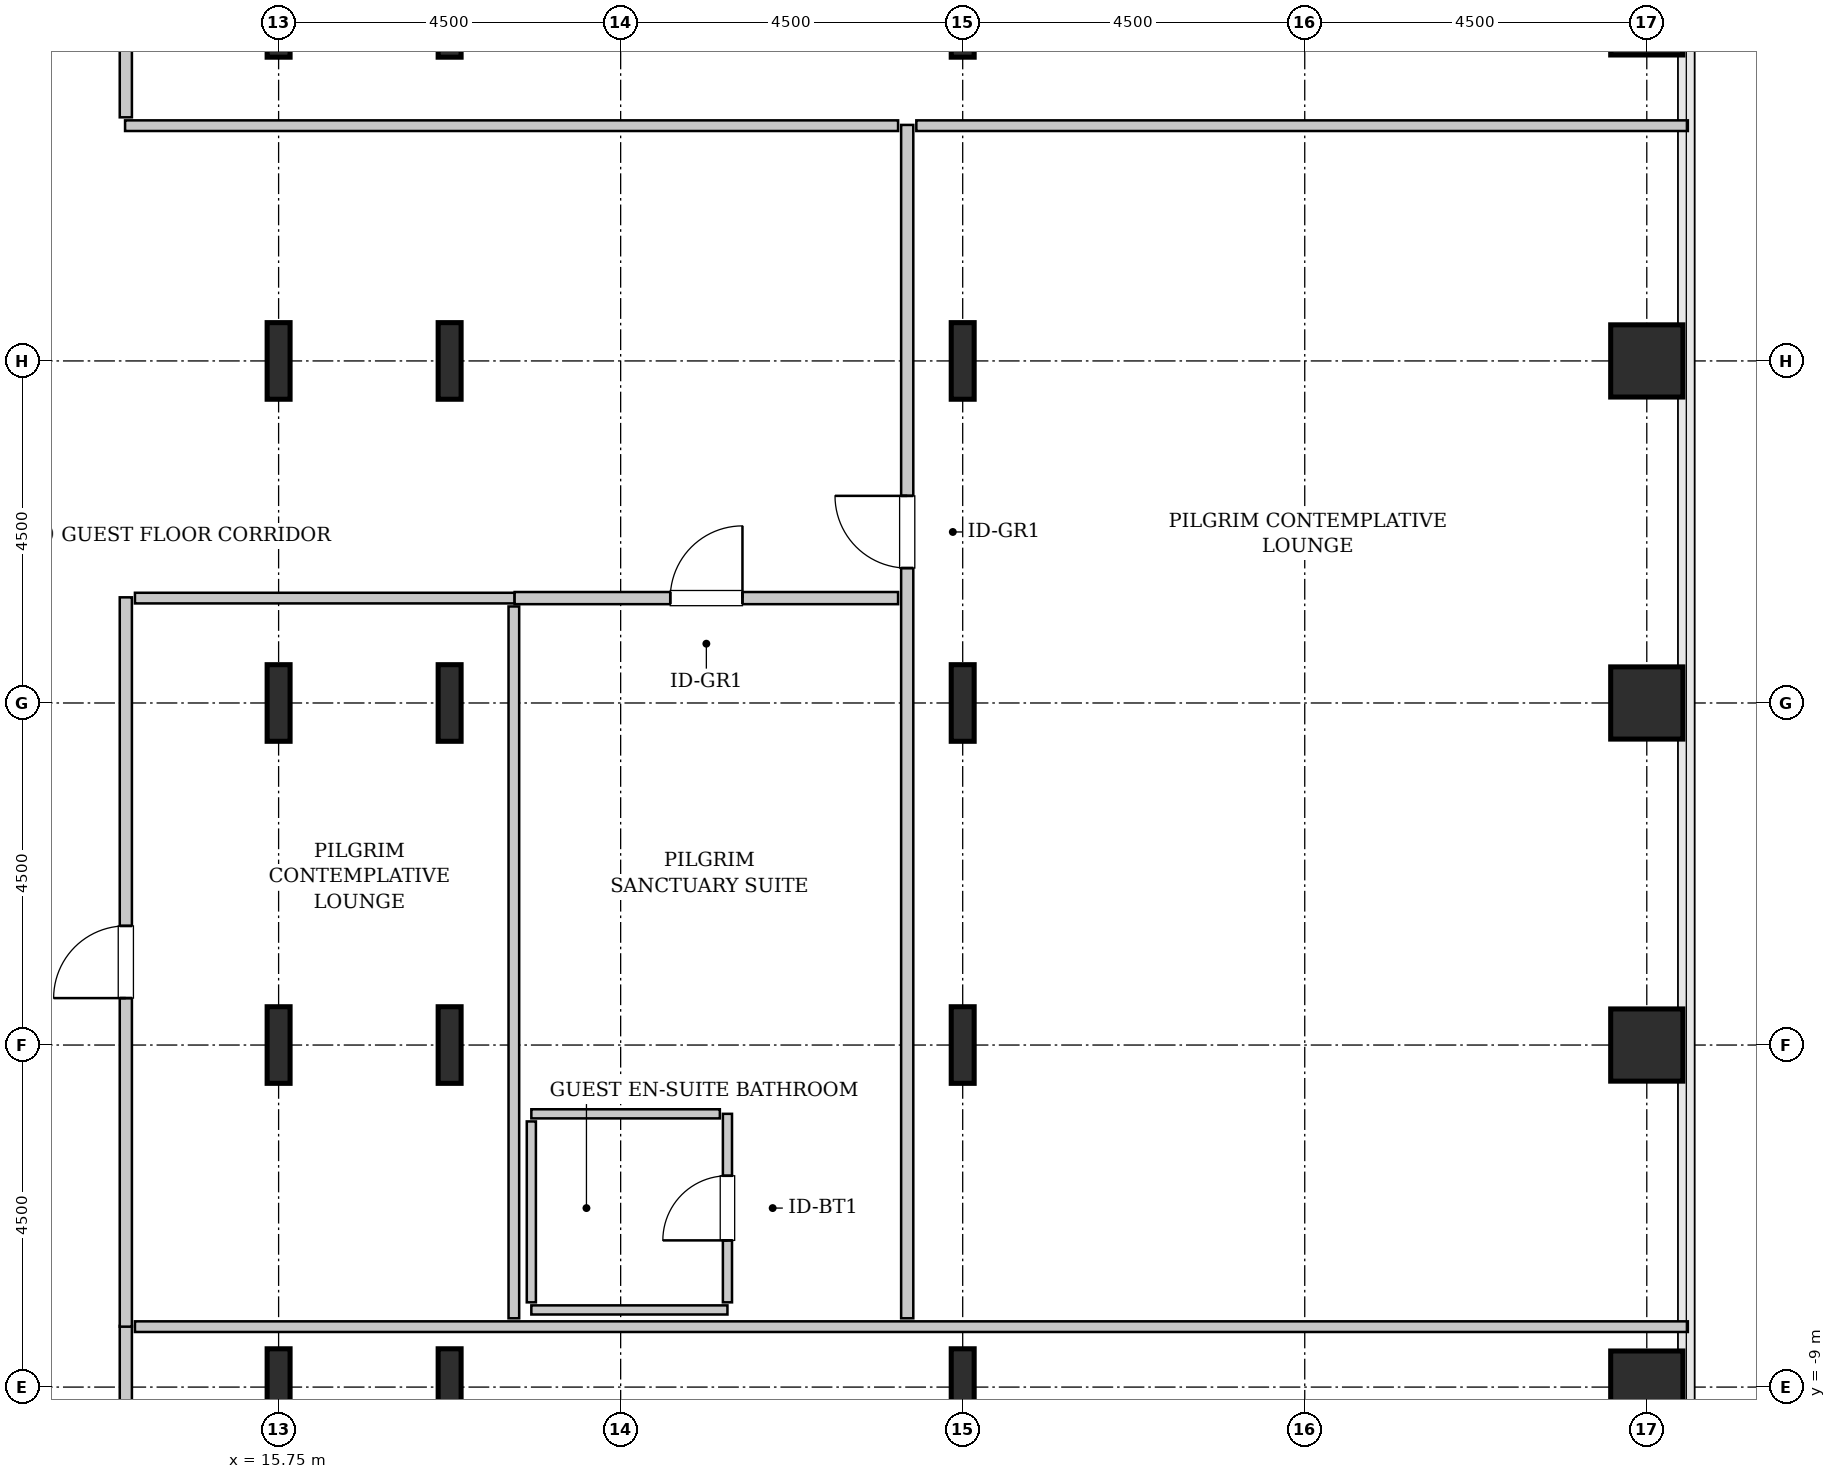
"""IFC4 building model, lengths in metres.
Left out: names, types, materials, properties, quantities, classifications, styles, units other than length and angle.
Written with IfcOpenShell. Run it as: python <this file> out.ifc"""

import sys

from ifc_helpers import new_model, si_unit, direction, frame, frame_2d, origin, origin_2d, place, context, subcontext, project, spatial, rectangle, hollow_rectangle, i_section, extrude, source, transform, mapped, element, fill, save


model = new_model("IFC4")
c1 = context("Model", 3, precision=1e-05, world=origin(), true_north=direction((0.0, 1.0)))
c2 = subcontext(c1, "Body", "Model", "MODEL_VIEW")
j1 = project(units=[si_unit("LENGTHUNIT", "METRE"), si_unit("PLANEANGLEUNIT", "RADIAN")], contexts=[c1])
p1 = place(None, origin())
s1 = spatial("IfcSite", under=j1, at=p1, CompositionType="ELEMENT")
p2 = place(p1, origin())
s2 = spatial("IfcBuilding", under=s1, at=p2, CompositionType="ELEMENT")
p3 = place(p2, frame((0.0, 0.0, 82.4)))
s3 = spatial("IfcBuildingStorey", under=s2, at=p3, CompositionType="ELEMENT", Elevation=82.4)
m1 = source(origin(), c2, "Body", "SweptSolid", [
    extrude(i_section(OverallWidth=0.302, OverallDepth=1.008, WebThickness=0.021, FlangeThickness=0.04, FilletRadius=0.03, at=origin_2d()), origin(), (0.0, 0.0, 1.0), 3.8),
])
for number, where, z_axis, x_axis in (
    (1, (15.75, -9.0, 0.0), (0.0, 0.0, 1.0), (1.0, 0.0, 0.0)),
    (2, (15.75, -4.5, 0.0), (0.0, 0.0, 1.0), (1.0, 0.0, 0.0)),
    (3, (15.75, 0.0, 0.0), (0.0, 0.0, 1.0), (1.0, 0.0, 0.0)),
    (4, (15.75, 4.5, 0.0), (0.0, 0.0, 1.0), (1.0, 0.0, 0.0)),
    (5, (15.75, 9.0, 0.0), (0.0, 0.0, 1.0), (1.0, 0.0, 0.0)),
    (6, (18.0, -9.0, 0.0), (0.0, 0.0, 1.0), (1.0, 0.0, 0.0)),
    (7, (18.0, -4.5, 0.0), (0.0, 0.0, 1.0), (1.0, 0.0, 0.0)),
    (8, (18.0, 0.0, 0.0), (0.0, 0.0, 1.0), (1.0, 0.0, 0.0)),
    (9, (18.0, 4.5, 0.0), (0.0, 0.0, 1.0), (1.0, 0.0, 0.0)),
    (10, (18.0, 9.0, 0.0), (0.0, 0.0, 1.0), (1.0, 0.0, 0.0)),
    (11, (24.75, -9.0, 0.0), (0.0, 0.0, 1.0), (1.0, 0.0, 0.0)),
    (12, (24.75, -4.5, 0.0), (0.0, 0.0, 1.0), (1.0, 0.0, 0.0)),
    (13, (24.75, 0.0, 0.0), (0.0, 0.0, 1.0), (1.0, 0.0, 0.0)),
    (14, (24.75, 4.5, 0.0), (0.0, 0.0, 1.0), (1.0, 0.0, 0.0)),
    (15, (24.75, 9.0, 0.0), (0.0, 0.0, 1.0), (1.0, 0.0, 0.0)),
):
    element("IfcColumn", number, at=place(p3, frame(where, z_axis=z_axis, x_axis=x_axis)), inside=s3, PredefinedType="COLUMN", context=c2, shape_type="MappedRepresentation", body=[
        mapped(m1, transform((0.0, 0.0, 0.0), x_axis=(1.0, 0.0, 0.0), y_axis=(0.0, 1.0, 0.0), z_axis=(0.0, 0.0, 1.0), scale=1.0)),
    ])
m2 = source(origin(), c2, "Body", "SweptSolid", [
    extrude(hollow_rectangle(XDim=0.95, YDim=0.95, WallThickness=0.045, InnerFilletRadius=0.045, OuterFilletRadius=0.09, at=origin_2d()), origin(), (0.0, 0.0, 1.0), 3.8),
])
for number, where, z_axis, x_axis in (
    (16, (33.75, -9.0, 0.0), (0.0, 0.0, 1.0), (1.0, 0.0, 0.0)),
    (17, (33.75, -4.5, 0.0), (0.0, 0.0, 1.0), (1.0, 0.0, 0.0)),
    (18, (33.75, 0.0, 0.0), (0.0, 0.0, 1.0), (1.0, 0.0, 0.0)),
    (19, (33.75, 4.5, 0.0), (0.0, 0.0, 1.0), (1.0, 0.0, 0.0)),
    (20, (33.75, 9.0, 0.0), (0.0, 0.0, 1.0), (1.0, 0.0, 0.0)),
):
    element("IfcColumn", number, at=place(p3, frame(where, z_axis=z_axis, x_axis=x_axis)), inside=s3, PredefinedType="COLUMN", context=c2, shape_type="MappedRepresentation", body=[
        mapped(m2, transform((0.0, 0.0, 0.0), x_axis=(1.0, 0.0, 0.0), y_axis=(0.0, 1.0, 0.0), z_axis=(0.0, 0.0, 1.0), scale=1.0)),
    ])
m3 = source(origin(), c2, "Body", "SweptSolid", [
    extrude(rectangle(XDim=2.58, YDim=0.12, at=frame_2d((1.29, 0.0))), origin(), (0.0, 0.0, 1.0), 3.485),
])
p4 = place(p3, frame((19.075, -7.985, 0.0), z_axis=(0.0, 0.0, 1.0), x_axis=(1.0, 0.0, 0.0)))
e21 = element("IfcWall", 21, at=p4, inside=s3, PredefinedType="PLUMBINGWALL", context=c2, shape_type="MappedRepresentation", body=[
    mapped(m3, transform((0.0, 0.0, 0.0), x_axis=(1.0, 0.0, 0.0), y_axis=(0.0, 1.0, 0.0), z_axis=(0.0, 0.0, 1.0), scale=1.0)),
])
m4 = source(origin(), c2, "Body", "SweptSolid", [
    extrude(rectangle(XDim=2.48, YDim=0.12, at=frame_2d((1.24, 0.0))), origin(), (0.0, 0.0, 1.0), 3.485),
])
p5 = place(p3, frame((21.655, -7.885, 0.0), z_axis=(0.0, 0.0, 1.0), x_axis=(0.0, 1.0, 0.0)))
e22 = element("IfcWall", 22, at=p5, inside=s3, PredefinedType="PLUMBINGWALL", context=c2, shape_type="MappedRepresentation", body=[
    mapped(m4, transform((0.0, 0.0, 0.0), x_axis=(1.0, 0.0, 0.0), y_axis=(0.0, 1.0, 0.0), z_axis=(0.0, 0.0, 1.0), scale=1.0)),
])
p6 = place(p5, frame((0.815, 0.0, 0.0)))
e23 = element("IfcOpeningElement", 23, at=p6, cuts=e22, PredefinedType="OPENING", context=c2, shape_type="SweptSolid", body=[
    extrude(rectangle(XDim=0.85, YDim=2.1, at=frame_2d((0.425, 1.05))), frame((0.0, 0.07, 0.0), z_axis=(0.0, -1.0, 0.0), x_axis=(1.0, 0.0, 0.0)), (0.0, 0.0, 1.0), 0.14),
])
p7 = place(p3, frame((19.075, -5.405, 0.0), z_axis=(0.0, 0.0, 1.0), x_axis=(1.0, 0.0, 0.0)))
e24 = element("IfcWall", 24, at=p7, inside=s3, PredefinedType="PLUMBINGWALL", context=c2, shape_type="MappedRepresentation", body=[
    mapped(m4, transform((0.0, 0.0, 0.0), x_axis=(1.0, 0.0, 0.0), y_axis=(0.0, 1.0, 0.0), z_axis=(0.0, 0.0, 1.0), scale=1.0)),
])
m5 = source(origin(), c2, "Body", "SweptSolid", [
    extrude(rectangle(XDim=2.38, YDim=0.12, at=frame_2d((1.19, 0.0))), origin(), (0.0, 0.0, 1.0), 3.485),
])
p8 = place(p3, frame((19.075, -7.885, 0.0), z_axis=(0.0, 0.0, 1.0), x_axis=(0.0, 1.0, 0.0)))
e25 = element("IfcWall", 25, at=p8, inside=s3, PredefinedType="PLUMBINGWALL", context=c2, shape_type="MappedRepresentation", body=[
    mapped(m5, transform((0.0, 0.0, 0.0), x_axis=(1.0, 0.0, 0.0), y_axis=(0.0, 1.0, 0.0), z_axis=(0.0, 0.0, 1.0), scale=1.0)),
])
m6 = source(origin(), c2, "Body", "SweptSolid", [
    extrude(rectangle(XDim=14.845, YDim=0.16, at=frame_2d((7.422, 0.0))), origin(), (0.0, 0.0, 1.0), 3.485),
])
p9 = place(p3, frame((13.74, -23.04, 0.0), z_axis=(0.0, 0.0, 1.0), x_axis=(0.0, 1.0, 0.0)))
e26 = element("IfcWall", 26, at=p9, inside=s3, PredefinedType="PARTITIONING", context=c2, shape_type="MappedRepresentation", body=[
    mapped(m6, transform((0.0, 0.0, 0.0), x_axis=(1.0, 0.0, 0.0), y_axis=(0.0, 1.0, 0.0), z_axis=(0.0, 0.0, 1.0), scale=1.0)),
])
p10 = place(p9, frame((12.712, 0.0, 0.0)))
e27 = element("IfcOpeningElement", 27, at=p10, cuts=e26, PredefinedType="OPENING", context=c2, shape_type="SweptSolid", body=[
    extrude(rectangle(XDim=0.95, YDim=2.1, at=frame_2d((0.475, 1.05))), frame((0.0, 0.09, 0.0), z_axis=(0.0, -1.0, 0.0), x_axis=(1.0, 0.0, 0.0)), (0.0, 0.0, 1.0), 0.18),
])
m7 = source(origin(), c2, "Body", "SweptSolid", [
    extrude(rectangle(XDim=20.43, YDim=0.14, at=frame_2d((10.215, 0.0))), origin(), (0.0, 0.0, 1.0), 3.485),
])
p11 = place(p3, frame((13.86, -8.205, 0.0), z_axis=(0.0, 0.0, 1.0), x_axis=(1.0, 0.0, 0.0)))
e28 = element("IfcWall", 28, at=p11, inside=s3, PredefinedType="PARTITIONING", context=c2, shape_type="MappedRepresentation", body=[
    mapped(m7, transform((0.0, 0.0, 0.0), x_axis=(1.0, 0.0, 0.0), y_axis=(0.0, 1.0, 0.0), z_axis=(0.0, 0.0, 1.0), scale=1.0)),
])
m8 = source(origin(), c2, "Body", "SweptSolid", [
    extrude(rectangle(XDim=15.7, YDim=0.16, at=frame_2d((7.85, 0.0))), origin(), (0.0, 0.0, 1.0), 3.485),
])
p12 = place(p3, frame((24.02, -8.095, 0.0), z_axis=(0.0, 0.0, 1.0), x_axis=(0.0, 1.0, 0.0)))
e29 = element("IfcWall", 29, at=p12, inside=s3, PredefinedType="PARTITIONING", context=c2, shape_type="MappedRepresentation", body=[
    mapped(m8, transform((0.0, 0.0, 0.0), x_axis=(1.0, 0.0, 0.0), y_axis=(0.0, 1.0, 0.0), z_axis=(0.0, 0.0, 1.0), scale=1.0)),
])
p13 = place(p12, frame((9.87, 0.0, 0.0)))
e30 = element("IfcOpeningElement", 30, at=p13, cuts=e29, PredefinedType="OPENING", context=c2, shape_type="SweptSolid", body=[
    extrude(rectangle(XDim=0.95, YDim=2.1, at=frame_2d((0.475, 1.05))), frame((0.0, 0.09, 0.0), z_axis=(0.0, -1.0, 0.0), x_axis=(1.0, 0.0, 0.0)), (0.0, 0.0, 1.0), 0.18),
])
m9 = source(origin(), c2, "Body", "SweptSolid", [
    extrude(rectangle(XDim=10.17, YDim=0.14, at=frame_2d((5.085, 0.0))), origin(), (0.0, 0.0, 1.0), 3.485),
])
p14 = place(p3, frame((13.73, 7.595, 0.0), z_axis=(0.0, 0.0, 1.0), x_axis=(1.0, 0.0, 0.0)))
e31 = element("IfcWall", 31, at=p14, inside=s3, PredefinedType="PARTITIONING", context=c2, shape_type="MappedRepresentation", body=[
    mapped(m9, transform((0.0, 0.0, 0.0), x_axis=(1.0, 0.0, 0.0), y_axis=(0.0, 1.0, 0.0), z_axis=(0.0, 0.0, 1.0), scale=1.0)),
])
m10 = source(origin(), c2, "Body", "SweptSolid", [
    extrude(rectangle(XDim=10.15, YDim=0.14, at=frame_2d((5.075, 0.0))), origin(), (0.0, 0.0, 1.0), 3.485),
])
p15 = place(p3, frame((24.14, 7.595, 0.0), z_axis=(0.0, 0.0, 1.0), x_axis=(1.0, 0.0, 0.0)))
e32 = element("IfcWall", 32, at=p15, inside=s3, PredefinedType="PARTITIONING", context=c2, shape_type="MappedRepresentation", body=[
    mapped(m10, transform((0.0, 0.0, 0.0), x_axis=(1.0, 0.0, 0.0), y_axis=(0.0, 1.0, 0.0), z_axis=(0.0, 0.0, 1.0), scale=1.0)),
])
m11 = source(origin(), c2, "Body", "SweptSolid", [
    extrude(rectangle(XDim=9.595, YDim=0.16, at=frame_2d((4.797, 0.0))), origin(), (0.0, 0.0, 1.0), 3.485),
])
p16 = place(p3, frame((13.74, -8.205, 0.0), z_axis=(0.0, 0.0, 1.0), x_axis=(0.0, 1.0, 0.0)))
e33 = element("IfcWall", 33, at=p16, inside=s3, PredefinedType="PARTITIONING", context=c2, shape_type="MappedRepresentation", body=[
    mapped(m11, transform((0.0, 0.0, 0.0), x_axis=(1.0, 0.0, 0.0), y_axis=(0.0, 1.0, 0.0), z_axis=(0.0, 0.0, 1.0), scale=1.0)),
])
p17 = place(p16, frame((4.323, 0.0, 0.0)))
e34 = element("IfcOpeningElement", 34, at=p17, cuts=e33, PredefinedType="OPENING", context=c2, shape_type="SweptSolid", body=[
    extrude(rectangle(XDim=0.95, YDim=2.1, at=frame_2d((0.475, 1.05))), frame((0.0, 0.09, 0.0), z_axis=(0.0, -1.0, 0.0), x_axis=(1.0, 0.0, 0.0)), (0.0, 0.0, 1.0), 0.18),
])
m12 = source(origin(), c2, "Body", "SweptSolid", [
    extrude(rectangle(XDim=4.995, YDim=0.14, at=frame_2d((2.498, 0.0))), origin(), (0.0, 0.0, 1.0), 3.485),
])
p18 = place(p3, frame((13.86, 1.38, 0.0), z_axis=(0.0, 0.0, 1.0), x_axis=(1.0, 0.0, 0.0)))
e35 = element("IfcWall", 35, at=p18, inside=s3, PredefinedType="PARTITIONING", context=c2, shape_type="MappedRepresentation", body=[
    mapped(m12, transform((0.0, 0.0, 0.0), x_axis=(1.0, 0.0, 0.0), y_axis=(0.0, 1.0, 0.0), z_axis=(0.0, 0.0, 1.0), scale=1.0)),
])
m13 = source(origin(), c2, "Body", "SweptSolid", [
    extrude(rectangle(XDim=9.365, YDim=0.14, at=frame_2d((4.683, 0.0))), origin(), (0.0, 0.0, 1.0), 3.485),
])
p19 = place(p3, frame((18.845, -8.095, 0.0), z_axis=(0.0, 0.0, 1.0), x_axis=(0.0, 1.0, 0.0)))
e36 = element("IfcWall", 36, at=p19, inside=s3, PredefinedType="PARTITIONING", context=c2, shape_type="MappedRepresentation", body=[
    mapped(m13, transform((0.0, 0.0, 0.0), x_axis=(1.0, 0.0, 0.0), y_axis=(0.0, 1.0, 0.0), z_axis=(0.0, 0.0, 1.0), scale=1.0)),
])
m14 = source(origin(), c2, "Body", "SweptSolid", [
    extrude(rectangle(XDim=5.045, YDim=0.16, at=frame_2d((2.522, 0.0))), origin(), (0.0, 0.0, 1.0), 3.485),
])
p20 = place(p3, frame((18.855, 1.38, 0.0), z_axis=(0.0, 0.0, 1.0), x_axis=(1.0, 0.0, 0.0)))
e37 = element("IfcWall", 37, at=p20, inside=s3, PredefinedType="PARTITIONING", context=c2, shape_type="MappedRepresentation", body=[
    mapped(m14, transform((0.0, 0.0, 0.0), x_axis=(1.0, 0.0, 0.0), y_axis=(0.0, 1.0, 0.0), z_axis=(0.0, 0.0, 1.0), scale=1.0)),
])
p21 = place(p20, frame((2.048, 0.0, 0.0)))
e38 = element("IfcOpeningElement", 38, at=p21, cuts=e37, PredefinedType="OPENING", context=c2, shape_type="SweptSolid", body=[
    extrude(rectangle(XDim=0.95, YDim=2.1, at=frame_2d((0.475, 1.05))), frame((0.0, 0.09, 0.0), z_axis=(0.0, -1.0, 0.0), x_axis=(1.0, 0.0, 0.0)), (0.0, 0.0, 1.0), 0.18),
])
m15 = source(origin(), c2, "Body", "SweptSolid", [
    extrude(rectangle(XDim=15.335, YDim=0.16, at=frame_2d((7.667, 0.0))), origin(), (0.0, 0.0, 1.0), 3.485),
])
p22 = place(p3, frame((13.74, 7.705, 0.0), z_axis=(0.0, 0.0, 1.0), x_axis=(0.0, 1.0, 0.0)))
e39 = element("IfcWall", 39, at=p22, inside=s3, PredefinedType="PARTITIONING", context=c2, shape_type="MappedRepresentation", body=[
    mapped(m15, transform((0.0, 0.0, 0.0), x_axis=(1.0, 0.0, 0.0), y_axis=(0.0, 1.0, 0.0), z_axis=(0.0, 0.0, 1.0), scale=1.0)),
])
p23 = place(p22, frame((1.427, 0.0, 0.0)))
e40 = element("IfcOpeningElement", 40, at=p23, cuts=e39, PredefinedType="OPENING", context=c2, shape_type="SweptSolid", body=[
    extrude(rectangle(XDim=0.95, YDim=2.1, at=frame_2d((0.475, 1.05))), frame((0.0, 0.09, 0.0), z_axis=(0.0, -1.0, 0.0), x_axis=(1.0, 0.0, 0.0)), (0.0, 0.0, 1.0), 0.18),
])
m16 = source(origin(), c2, "Body", "SweptSolid", [
    extrude(rectangle(XDim=0.85, YDim=2.1, at=frame_2d((0.425, 1.05))), frame((0.0, 0.025, 0.0), z_axis=(0.0, -1.0, 0.0), x_axis=(1.0, 0.0, 0.0)), (0.0, 0.0, 1.0), 0.05),
])
p24 = place(p6, origin())
e41 = element("IfcDoor", 41, at=p24, inside=s3, OperationType="SINGLE_SWING_LEFT", PredefinedType="DOOR", context=c2, shape_type="MappedRepresentation", body=[
    mapped(m16, transform((0.0, 0.0, 0.0), x_axis=(1.0, 0.0, 0.0), y_axis=(0.0, 1.0, 0.0), z_axis=(0.0, 0.0, 1.0), scale=1.0)),
])
fill(e23, e41)
m17 = source(origin(), c2, "Body", "SweptSolid", [
    extrude(rectangle(XDim=0.95, YDim=2.1, at=frame_2d((0.475, 1.05))), frame((0.0, 0.025, 0.0), z_axis=(0.0, -1.0, 0.0), x_axis=(1.0, 0.0, 0.0)), (0.0, 0.0, 1.0), 0.05),
])
p25 = place(p13, origin())
e42 = element("IfcDoor", 42, at=p25, inside=s3, OperationType="SINGLE_SWING_RIGHT", PredefinedType="DOOR", context=c2, shape_type="MappedRepresentation", body=[
    mapped(m17, transform((0.0, 0.0, 0.0), x_axis=(1.0, 0.0, 0.0), y_axis=(0.0, 1.0, 0.0), z_axis=(0.0, 0.0, 1.0), scale=1.0)),
])
fill(e30, e42)
p26 = place(p17, origin())
e43 = element("IfcDoor", 43, at=p26, inside=s3, OperationType="SINGLE_SWING_LEFT", PredefinedType="DOOR", context=c2, shape_type="MappedRepresentation", body=[
    mapped(m17, transform((0.0, 0.0, 0.0), x_axis=(1.0, 0.0, 0.0), y_axis=(0.0, 1.0, 0.0), z_axis=(0.0, 0.0, 1.0), scale=1.0)),
])
fill(e34, e43)
p27 = place(p21, origin())
e44 = element("IfcDoor", 44, at=p27, inside=s3, OperationType="SINGLE_SWING_RIGHT", PredefinedType="DOOR", context=c2, shape_type="MappedRepresentation", body=[
    mapped(m17, transform((0.0, 0.0, 0.0), x_axis=(1.0, 0.0, 0.0), y_axis=(0.0, 1.0, 0.0), z_axis=(0.0, 0.0, 1.0), scale=1.0)),
])
fill(e38, e44)
save(model, sys.argv[1])
